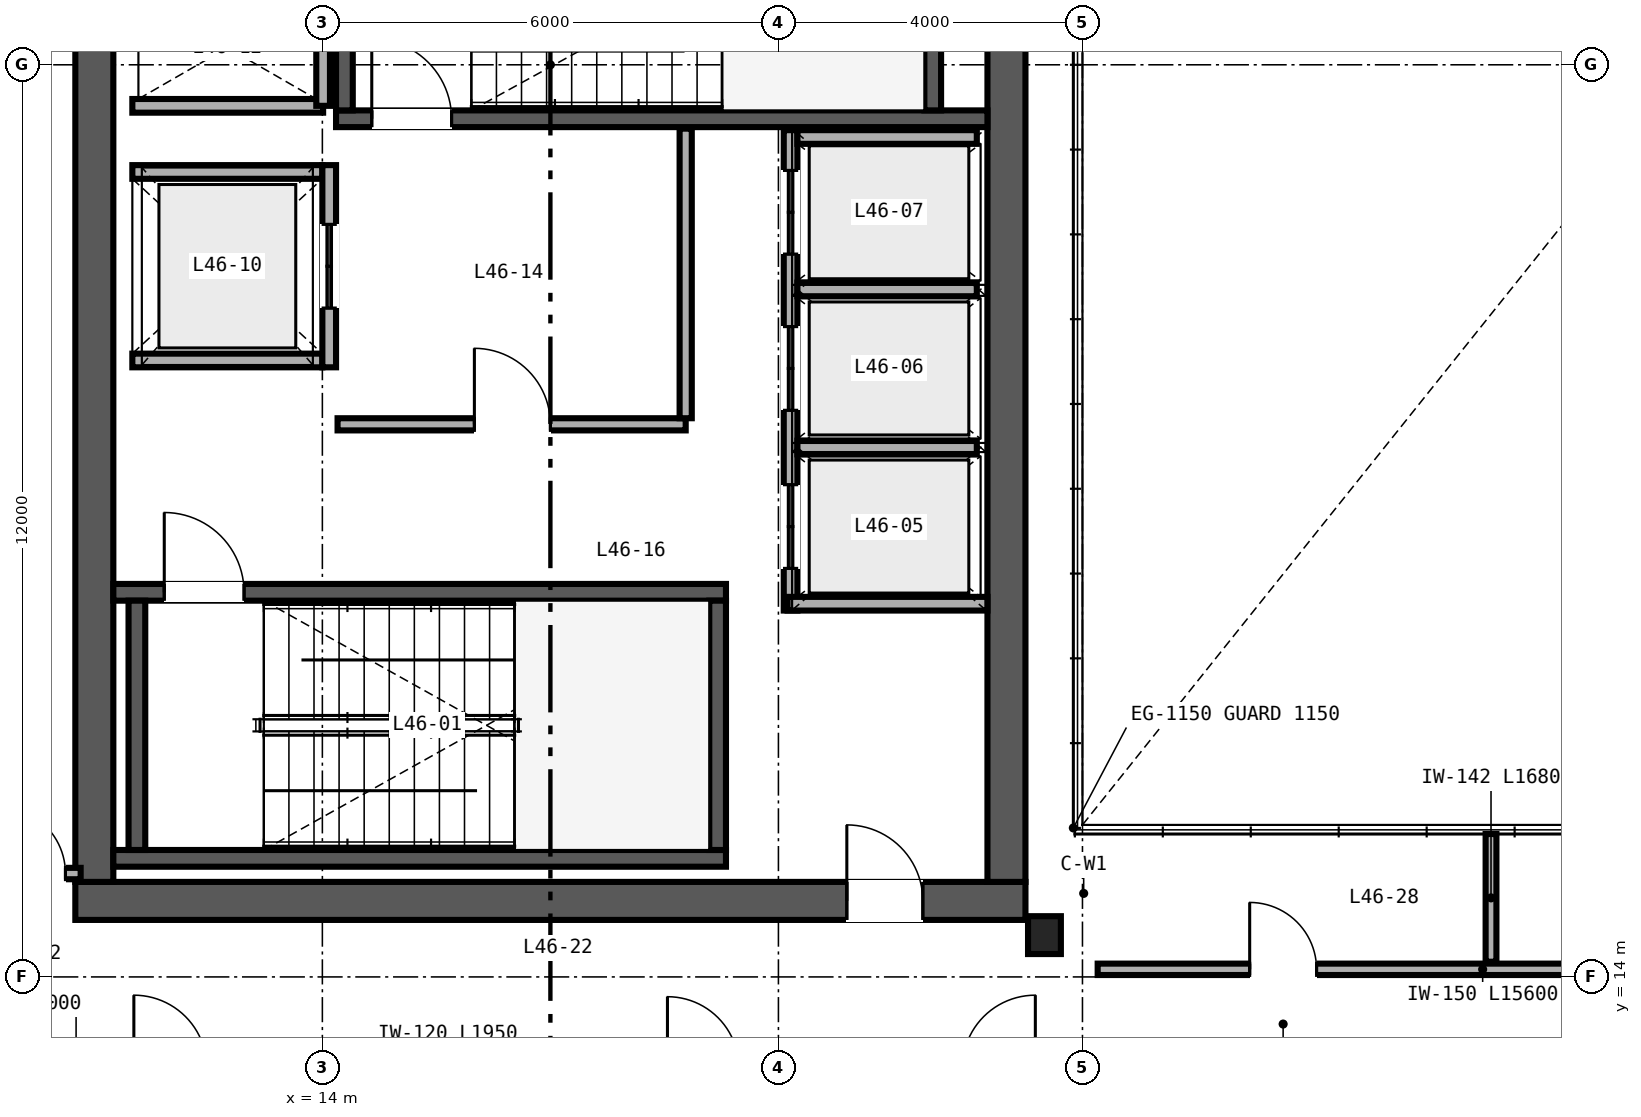
"""IFC4 building model, lengths in metres.
Left out: names, types, materials, properties, quantities, classifications, styles, units other than length and angle.
Written with IfcOpenShell. Run it as: python <this file> out.ifc"""

import sys

from ifc_helpers import new_model, si_unit, direction, frame, frame_2d, origin, origin_2d, place, context, subcontext, project, spatial, rectangle, i_section, extrude, source, transform, mapped, element, fill, save


model = new_model("IFC4")
c1 = context("Model", 3, precision=1e-05, world=origin(), true_north=direction((0.0, 1.0)))
c2 = subcontext(c1, "Body", "Model", "MODEL_VIEW")
j1 = project(units=[si_unit("LENGTHUNIT", "METRE"), si_unit("PLANEANGLEUNIT", "RADIAN")], contexts=[c1])
p1 = place(None, origin())
s1 = spatial("IfcSite", under=j1, at=p1, CompositionType="ELEMENT")
p2 = place(p1, origin())
s2 = spatial("IfcBuilding", under=s1, at=p2, CompositionType="ELEMENT")
p3 = place(p2, frame((0.0, 0.0, 184.8)))
s3 = spatial("IfcBuildingStorey", under=s2, at=p3, CompositionType="ELEMENT", Elevation=184.8)
p4 = place(p3, frame((10.75, 15.0, 0.0), z_axis=(0.0, 0.0, 1.0), x_axis=(1.0, 0.0, 0.0)))
e1 = element("IfcWall", 1, at=p4, inside=s3, PredefinedType="SHEAR", context=c2, shape_type="SweptSolid", body=[
    extrude(rectangle(XDim=12.5, YDim=0.5, at=frame_2d((6.25, 0.0))), origin(), (0.0, 0.0, 1.0), 3.37),
])
p5 = place(p4, frame((10.15, 0.0, 0.0)))
e2 = element("IfcOpeningElement", 2, at=p5, cuts=e1, PredefinedType="OPENING", context=c2, shape_type="SweptSolid", body=[
    extrude(rectangle(XDim=1.0, YDim=2.15, at=frame_2d((0.5, 1.075))), frame((0.0, 0.26, 0.0), z_axis=(0.0, -1.0, 0.0), x_axis=(1.0, 0.0, 0.0)), (0.0, 0.0, 1.0), 0.52),
])
for number, where, z_axis, x_axis in (
    (3, (11.0, 15.25, 0.0), (0.0, 0.0, 1.0), (0.0, 1.0, 0.0)),
    (4, (23.0, 15.25, 0.0), (0.0, 0.0, 1.0), (0.0, 1.0, 0.0)),
):
    element("IfcWall", number, at=place(p3, frame(where, z_axis=z_axis, x_axis=x_axis)), inside=s3, PredefinedType="SHEAR", context=c2, shape_type="SweptSolid", body=[
        extrude(rectangle(XDim=21.5, YDim=0.5, at=frame_2d((10.75, 0.0))), origin(), (0.0, 0.0, 1.0), 3.37),
    ])
p6 = place(p3, frame((11.25, 15.56, 0.0), z_axis=(0.0, 0.0, 1.0), x_axis=(1.0, 0.0, 0.0)))
e5 = element("IfcWall", 5, at=p6, inside=s3, PredefinedType="SHEAR", context=c2, shape_type="SweptSolid", body=[
    extrude(rectangle(XDim=8.06, YDim=0.22, at=frame_2d((4.03, 0.0))), origin(), (0.0, 0.0, 1.0), 3.4),
])
p7 = place(p3, frame((11.25, 19.06, 0.0), z_axis=(0.0, 0.0, 1.0), x_axis=(1.0, 0.0, 0.0)))
e6 = element("IfcWall", 6, at=p7, inside=s3, PredefinedType="SHEAR", context=c2, shape_type="SweptSolid", body=[
    extrude(rectangle(XDim=8.06, YDim=0.22, at=frame_2d((4.03, 0.0))), origin(), (0.0, 0.0, 1.0), 3.4),
])
p8 = place(p7, frame((0.67, 0.0, 0.0)))
e7 = element("IfcOpeningElement", 7, at=p8, cuts=e6, PredefinedType="OPENING", context=c2, shape_type="SweptSolid", body=[
    extrude(rectangle(XDim=1.05, YDim=2.15, at=frame_2d((0.525, 1.075))), frame((0.0, 0.12, 0.0), z_axis=(0.0, -1.0, 0.0), x_axis=(1.0, 0.0, 0.0)), (0.0, 0.0, 1.0), 0.24),
])
for number, where, z_axis, x_axis in (
    (8, (11.56, 15.67, 0.0), (0.0, 0.0, 1.0), (0.0, 1.0, 0.0)),
    (9, (19.2, 15.67, 0.0), (0.0, 0.0, 1.0), (0.0, 1.0, 0.0)),
):
    element("IfcWall", number, at=place(p3, frame(where, z_axis=z_axis, x_axis=x_axis)), inside=s3, PredefinedType="SHEAR", context=c2, shape_type="SweptSolid", body=[
        extrude(rectangle(XDim=3.28, YDim=0.22, at=frame_2d((1.64, 0.0))), origin(), (0.0, 0.0, 1.0), 3.4),
    ])
p9 = place(p3, frame((14.18, 25.29, 0.0), z_axis=(0.0, 0.0, 1.0), x_axis=(1.0, 0.0, 0.0)))
e10 = element("IfcWall", 10, at=p9, inside=s3, PredefinedType="SHEAR", context=c2, shape_type="SweptSolid", body=[
    extrude(rectangle(XDim=8.57, YDim=0.22, at=frame_2d((4.285, 0.0))), origin(), (0.0, 0.0, 1.0), 3.4),
])
p10 = place(p9, frame((0.47, 0.0, 0.0)))
e11 = element("IfcOpeningElement", 11, at=p10, cuts=e10, PredefinedType="OPENING", context=c2, shape_type="SweptSolid", body=[
    extrude(rectangle(XDim=1.05, YDim=2.15, at=frame_2d((0.525, 1.075))), frame((0.0, 0.12, 0.0), z_axis=(0.0, -1.0, 0.0), x_axis=(1.0, 0.0, 0.0)), (0.0, 0.0, 1.0), 0.24),
])
for number, where, z_axis, x_axis in (
    (12, (14.29, 25.4, 0.0), (0.0, 0.0, 1.0), (0.0, 1.0, 0.0)),
    (13, (22.03, 25.4, 0.0), (0.0, 0.0, 1.0), (0.0, 1.0, 0.0)),
):
    element("IfcWall", number, at=place(p3, frame(where, z_axis=z_axis, x_axis=x_axis)), inside=s3, PredefinedType="SHEAR", context=c2, shape_type="SweptSolid", body=[
        extrude(rectangle(XDim=3.28, YDim=0.22, at=frame_2d((1.64, 0.0))), origin(), (0.0, 0.0, 1.0), 3.4),
    ])
m1 = source(origin(), c2, "Body", "SweptSolid", [
    extrude(i_section(OverallWidth=0.432, OverallDepth=0.498, WebThickness=0.056, FlangeThickness=0.089, FilletRadius=0.025, at=origin_2d()), origin(), (0.0, 0.0, 1.0), 3.37),
])
p11 = place(p3, frame((23.5, 14.55, 0.0), z_axis=(0.0, 0.0, 1.0), x_axis=(1.0, 0.0, 0.0)))
e14 = element("IfcColumn", 14, at=p11, inside=s3, PredefinedType="COLUMN", context=c2, shape_type="MappedRepresentation", body=[
    mapped(m1, transform((0.0, 0.0, 0.0), scale=1.0)),
])
p12 = place(p3, frame((20.16, 18.82, 0.0), z_axis=(0.0, 0.0, 1.0), x_axis=(0.0, 1.0, 0.0)))
e15 = element("IfcWall", 15, at=p12, inside=s3, PredefinedType="SOLIDWALL", context=c2, shape_type="SweptSolid", body=[
    extrude(rectangle(XDim=6.32, YDim=0.18, at=frame_2d((3.16, 0.0))), origin(), (0.0, 0.0, 1.0), 2.47),
])
p13 = place(p12, frame((0.555, 0.0, 0.0)))
e16 = element("IfcOpeningElement", 16, at=p13, cuts=e15, PredefinedType="OPENING", context=c2, shape_type="SweptSolid", body=[
    extrude(rectangle(XDim=1.1, YDim=2.2, at=frame_2d((0.55, 1.1))), frame((0.0, 0.1, 0.0), z_axis=(0.0, -1.0, 0.0), x_axis=(1.0, 0.0, 0.0)), (0.0, 0.0, 1.0), 0.2),
])
p14 = place(p12, frame((2.635, 0.0, 0.0)))
e17 = element("IfcOpeningElement", 17, at=p14, cuts=e15, PredefinedType="OPENING", context=c2, shape_type="SweptSolid", body=[
    extrude(rectangle(XDim=1.1, YDim=2.2, at=frame_2d((0.55, 1.1))), frame((0.0, 0.1, 0.0), z_axis=(0.0, -1.0, 0.0), x_axis=(1.0, 0.0, 0.0)), (0.0, 0.0, 1.0), 0.2),
])
p15 = place(p12, frame((4.69, 0.0, 0.0)))
e18 = element("IfcOpeningElement", 18, at=p15, cuts=e15, PredefinedType="OPENING", context=c2, shape_type="SweptSolid", body=[
    extrude(rectangle(XDim=1.1, YDim=2.2, at=frame_2d((0.55, 1.1))), frame((0.0, 0.1, 0.0), z_axis=(0.0, -1.0, 0.0), x_axis=(1.0, 0.0, 0.0)), (0.0, 0.0, 1.0), 0.2),
])
p16 = place(p3, frame((20.12, 18.91, 0.0), z_axis=(0.0, 0.0, 1.0), x_axis=(1.0, 0.0, 0.0)))
e19 = element("IfcWall", 19, at=p16, inside=s3, PredefinedType="SOLIDWALL", context=c2, shape_type="SweptSolid", body=[
    extrude(rectangle(XDim=2.63, YDim=0.18, at=frame_2d((1.315, 0.0))), origin(), (0.0, 0.0, 1.0), 3.37),
])
p17 = place(p3, frame((20.25, 25.05, 0.0), z_axis=(0.0, 0.0, 1.0), x_axis=(1.0, 0.0, 0.0)))
e20 = element("IfcWall", 20, at=p17, inside=s3, PredefinedType="SOLIDWALL", context=c2, shape_type="SweptSolid", body=[
    extrude(rectangle(XDim=2.36, YDim=0.18, at=frame_2d((1.18, 0.0))), origin(), (0.0, 0.0, 1.0), 3.37),
])
p18 = place(p3, frame((20.25, 20.965, 0.0), z_axis=(0.0, 0.0, 1.0), x_axis=(1.0, 0.0, 0.0)))
e21 = element("IfcWall", 21, at=p18, inside=s3, PredefinedType="SOLIDWALL", context=c2, shape_type="SweptSolid", body=[
    extrude(rectangle(XDim=2.36, YDim=0.18, at=frame_2d((1.18, 0.0))), origin(), (0.0, 0.0, 1.0), 2.47),
])
p19 = place(p3, frame((20.25, 23.045, 0.0), z_axis=(0.0, 0.0, 1.0), x_axis=(1.0, 0.0, 0.0)))
e22 = element("IfcWall", 22, at=p19, inside=s3, PredefinedType="SOLIDWALL", context=c2, shape_type="SweptSolid", body=[
    extrude(rectangle(XDim=2.36, YDim=0.18, at=frame_2d((1.18, 0.0))), origin(), (0.0, 0.0, 1.0), 3.37),
])
for number, where, z_axis, x_axis in (
    (23, (11.5, 22.11, 0.0), (0.0, 0.0, 1.0), (1.0, 0.0, 0.0)),
    (24, (11.5, 24.59, 0.0), (0.0, 0.0, 1.0), (1.0, 0.0, 0.0)),
):
    element("IfcWall", number, at=place(p3, frame(where, z_axis=z_axis, x_axis=x_axis)), inside=s3, PredefinedType="SOLIDWALL", context=c2, shape_type="SweptSolid", body=[
        extrude(rectangle(XDim=2.5, YDim=0.18, at=frame_2d((1.25, 0.0))), origin(), (0.0, 0.0, 1.0), 3.37),
    ])
p20 = place(p3, frame((14.09, 22.02, 0.0), z_axis=(0.0, 0.0, 1.0), x_axis=(0.0, 1.0, 0.0)))
e25 = element("IfcWall", 25, at=p20, inside=s3, PredefinedType="SOLIDWALL", context=c2, shape_type="SweptSolid", body=[
    extrude(rectangle(XDim=2.66, YDim=0.18, at=frame_2d((1.33, 0.0))), origin(), (0.0, 0.0, 1.0), 3.37),
])
p21 = place(p20, frame((0.78, 0.0, 0.0)))
e26 = element("IfcOpeningElement", 26, at=p21, cuts=e25, PredefinedType="OPENING", context=c2, shape_type="SweptSolid", body=[
    extrude(rectangle(XDim=1.1, YDim=2.2, at=frame_2d((0.55, 1.1))), frame((0.0, 0.1, 0.0), z_axis=(0.0, -1.0, 0.0), x_axis=(1.0, 0.0, 0.0)), (0.0, 0.0, 1.0), 0.2),
])
p22 = place(p3, frame((11.5, 25.46, 0.0), z_axis=(0.0, 0.0, 1.0), x_axis=(1.0, 0.0, 0.0)))
e27 = element("IfcWall", 27, at=p22, inside=s3, PredefinedType="SOLIDWALL", context=c2, shape_type="SweptSolid", body=[
    extrude(rectangle(XDim=2.51, YDim=0.18, at=frame_2d((1.255, 0.0))), origin(), (0.0, 0.0, 1.0), 3.37),
])
p23 = place(p3, frame((14.01, 25.46, 0.0), z_axis=(0.0, 0.0, 1.0), x_axis=(0.0, 1.0, 0.0)))
e28 = element("IfcWall", 28, at=p23, inside=s3, PredefinedType="SOLIDWALL", context=c2, shape_type="SweptSolid", body=[
    extrude(rectangle(XDim=3.08, YDim=0.18, at=frame_2d((1.54, 0.0))), origin(), (0.0, 0.0, 1.0), 3.37),
])
p24 = place(p3, frame((14.2, 21.27, 0.0), z_axis=(0.0, 0.0, 1.0), x_axis=(1.0, 0.0, 0.0)))
e29 = element("IfcWall", 29, at=p24, inside=s3, PredefinedType="PARTITIONING", context=c2, shape_type="SweptSolid", body=[
    extrude(rectangle(XDim=4.58, YDim=0.16, at=frame_2d((2.29, 0.0))), origin(), (0.0, 0.0, 1.0), 3.37),
])
p25 = place(p24, frame((1.8, 0.0, 0.0)))
e30 = element("IfcOpeningElement", 30, at=p25, cuts=e29, PredefinedType="OPENING", context=c2, shape_type="SweptSolid", body=[
    extrude(rectangle(XDim=1.0, YDim=2.15, at=frame_2d((0.5, 1.075))), frame((0.0, 0.09, 0.0), z_axis=(0.0, -1.0, 0.0), x_axis=(1.0, 0.0, 0.0)), (0.0, 0.0, 1.0), 0.18),
])
p26 = place(p3, frame((18.78, 21.35, 0.0), z_axis=(0.0, 0.0, 1.0), x_axis=(0.0, 1.0, 0.0)))
e31 = element("IfcWall", 31, at=p26, inside=s3, PredefinedType="PARTITIONING", context=c2, shape_type="SweptSolid", body=[
    extrude(rectangle(XDim=3.81, YDim=0.16, at=frame_2d((1.905, 0.0))), origin(), (0.0, 0.0, 1.0), 3.37),
])
p27 = place(p3, frame((24.2, 14.1, 0.0), z_axis=(0.0, 0.0, 1.0), x_axis=(1.0, 0.0, 0.0)))
e32 = element("IfcWall", 32, at=p27, inside=s3, PredefinedType="PARTITIONING", context=c2, shape_type="SweptSolid", body=[
    extrude(rectangle(XDim=15.6, YDim=0.15, at=frame_2d((7.8, 0.0))), origin(), (0.0, 0.0, 1.0), 3.37),
])
p28 = place(p27, frame((2.0, 0.0, 0.0)))
e33 = element("IfcOpeningElement", 33, at=p28, cuts=e32, PredefinedType="OPENING", context=c2, shape_type="SweptSolid", body=[
    extrude(rectangle(XDim=0.88, YDim=2.15, at=frame_2d((0.44, 1.075))), frame((0.0, 0.085, 0.0), z_axis=(0.0, -1.0, 0.0), x_axis=(1.0, 0.0, 0.0)), (0.0, 0.0, 1.0), 0.17),
])
p29 = place(p27, frame((7.25, 0.0, 0.0)))
e34 = element("IfcOpeningElement", 34, at=p29, cuts=e32, PredefinedType="OPENING", context=c2, shape_type="SweptSolid", body=[
    extrude(rectangle(XDim=0.88, YDim=2.15, at=frame_2d((0.44, 1.075))), frame((0.0, 0.085, 0.0), z_axis=(0.0, -1.0, 0.0), x_axis=(1.0, 0.0, 0.0)), (0.0, 0.0, 1.0), 0.17),
])
p30 = place(p27, frame((12.5, 0.0, 0.0)))
e35 = element("IfcOpeningElement", 35, at=p30, cuts=e32, PredefinedType="OPENING", context=c2, shape_type="SweptSolid", body=[
    extrude(rectangle(XDim=0.88, YDim=2.15, at=frame_2d((0.44, 1.075))), frame((0.0, 0.085, 0.0), z_axis=(0.0, -1.0, 0.0), x_axis=(1.0, 0.0, 0.0)), (0.0, 0.0, 1.0), 0.17),
])
p31 = place(p3, frame((29.375, 14.2, 0.0), z_axis=(0.0, 0.0, 1.0), x_axis=(0.0, 1.0, 0.0)))
e36 = element("IfcWall", 36, at=p31, inside=s3, PredefinedType="PARTITIONING", context=c2, shape_type="SweptSolid", body=[
    extrude(rectangle(XDim=1.68, YDim=0.142, at=frame_2d((0.84, 0.0))), origin(), (0.0, 0.0, 1.0), 3.37),
])
p32 = place(p3, frame((8.16, 15.36, 0.0), z_axis=(0.0, 0.0, 1.0), x_axis=(1.0, 0.0, 0.0)))
e37 = element("IfcWall", 37, at=p32, inside=s3, PredefinedType="PARTITIONING", context=c2, shape_type="SweptSolid", body=[
    extrude(rectangle(XDim=2.66, YDim=0.15, at=frame_2d((1.33, 0.0))), origin(), (0.0, 0.0, 1.0), 2.591),
])
p33 = place(p32, frame((1.58, 0.0, 0.0)))
e38 = element("IfcOpeningElement", 38, at=p33, cuts=e37, PredefinedType="OPENING", context=c2, shape_type="SweptSolid", body=[
    extrude(rectangle(XDim=0.88, YDim=2.15, at=frame_2d((0.44, 1.075))), frame((0.0, 0.085, 0.0), z_axis=(0.0, -1.0, 0.0), x_axis=(1.0, 0.0, 0.0)), (0.0, 0.0, 1.0), 0.17),
])
m2 = source(origin(), c2, "Body", "SweptSolid", [
    extrude(rectangle(XDim=1.05, YDim=2.15, at=frame_2d((0.525, 1.075))), frame((0.0, 0.025, 0.0), z_axis=(0.0, -1.0, 0.0), x_axis=(1.0, 0.0, 0.0)), (0.0, 0.0, 1.0), 0.05),
])
p34 = place(p8, origin())
e39 = element("IfcDoor", 39, at=p34, inside=s3, OperationType="SINGLE_SWING_LEFT", PredefinedType="DOOR", context=c2, shape_type="MappedRepresentation", body=[
    mapped(m2, transform((0.0, 0.0, 0.0), scale=1.0)),
])
fill(e7, e39)
p35 = place(p10, origin())
e40 = element("IfcDoor", 40, at=p35, inside=s3, OperationType="SINGLE_SWING_LEFT", PredefinedType="DOOR", context=c2, shape_type="MappedRepresentation", body=[
    mapped(m2, transform((0.0, 0.0, 0.0), scale=1.0)),
])
fill(e11, e40)
m3 = source(origin(), c2, "Body", "SweptSolid", [
    extrude(rectangle(XDim=1.1, YDim=2.2, at=frame_2d((0.55, 1.1))), frame((0.0, 0.025, 0.0), z_axis=(0.0, -1.0, 0.0), x_axis=(1.0, 0.0, 0.0)), (0.0, 0.0, 1.0), 0.05),
])
p36 = place(p13, origin())
e41 = element("IfcDoor", 41, at=p36, inside=s3, OperationType="DOUBLE_DOOR_SLIDING", PredefinedType="DOOR", context=c2, shape_type="MappedRepresentation", body=[
    mapped(m3, transform((0.0, 0.0, 0.0), scale=1.0)),
])
fill(e16, e41)
p37 = place(p14, origin())
e42 = element("IfcDoor", 42, at=p37, inside=s3, OperationType="DOUBLE_DOOR_SLIDING", PredefinedType="DOOR", context=c2, shape_type="MappedRepresentation", body=[
    mapped(m3, transform((0.0, 0.0, 0.0), scale=1.0)),
])
fill(e17, e42)
p38 = place(p15, origin())
e43 = element("IfcDoor", 43, at=p38, inside=s3, OperationType="DOUBLE_DOOR_SLIDING", PredefinedType="DOOR", context=c2, shape_type="MappedRepresentation", body=[
    mapped(m3, transform((0.0, 0.0, 0.0), scale=1.0)),
])
fill(e18, e43)
p39 = place(p21, origin())
e44 = element("IfcDoor", 44, at=p39, inside=s3, OperationType="DOUBLE_DOOR_SLIDING", PredefinedType="DOOR", context=c2, shape_type="MappedRepresentation", body=[
    mapped(m3, transform((0.0, 0.0, 0.0), scale=1.0)),
])
fill(e26, e44)
m4 = source(origin(), c2, "Body", "SweptSolid", [
    extrude(rectangle(XDim=1.0, YDim=2.15, at=frame_2d((0.5, 1.075))), frame((0.0, 0.025, 0.0), z_axis=(0.0, -1.0, 0.0), x_axis=(1.0, 0.0, 0.0)), (0.0, 0.0, 1.0), 0.05),
])
p40 = place(p25, origin())
e45 = element("IfcDoor", 45, at=p40, inside=s3, OperationType="SINGLE_SWING_LEFT", PredefinedType="DOOR", context=c2, shape_type="MappedRepresentation", body=[
    mapped(m4, transform((0.0, 0.0, 0.0), scale=1.0)),
])
fill(e30, e45)
p41 = place(p5, origin())
e46 = element("IfcDoor", 46, at=p41, inside=s3, OperationType="SINGLE_SWING_LEFT", PredefinedType="DOOR", context=c2, shape_type="MappedRepresentation", body=[
    mapped(m4, transform((0.0, 0.0, 0.0), scale=1.0)),
])
fill(e2, e46)
m5 = source(origin(), c2, "Body", "SweptSolid", [
    extrude(rectangle(XDim=0.88, YDim=2.15, at=frame_2d((0.44, 1.075))), frame((0.0, 0.025, 0.0), z_axis=(0.0, -1.0, 0.0), x_axis=(1.0, 0.0, 0.0)), (0.0, 0.0, 1.0), 0.05),
])
p42 = place(p28, origin())
e47 = element("IfcDoor", 47, at=p42, inside=s3, OperationType="SINGLE_SWING_LEFT", PredefinedType="DOOR", context=c2, shape_type="MappedRepresentation", body=[
    mapped(m5, transform((0.0, 0.0, 0.0), scale=1.0)),
])
fill(e33, e47)
p43 = place(p33, origin())
e48 = element("IfcDoor", 48, at=p43, inside=s3, OperationType="SINGLE_SWING_LEFT", PredefinedType="DOOR", context=c2, shape_type="MappedRepresentation", body=[
    mapped(m5, transform((0.0, 0.0, 0.0), scale=1.0)),
])
fill(e38, e48)
save(model, sys.argv[1])
